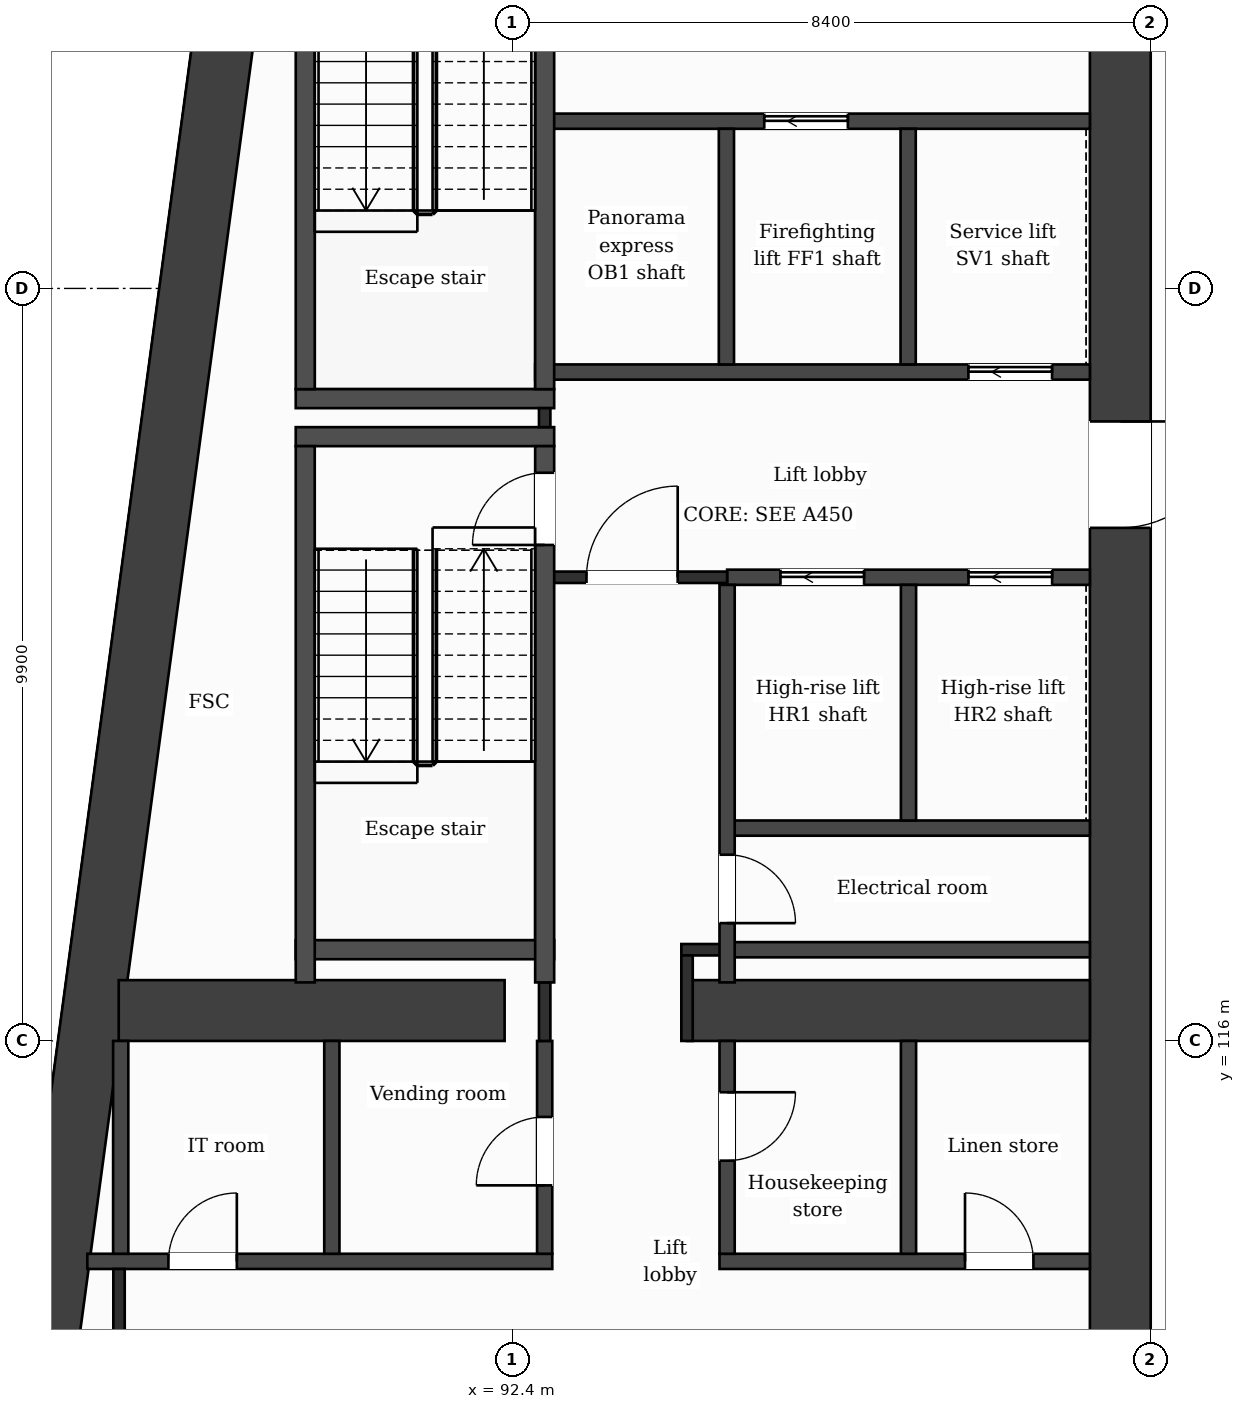
"""IFC4 building model, lengths in metres.
Left out: names, types, materials, properties, quantities, classifications, styles, units other than length and angle.
Written with IfcOpenShell. Run it as: python <this file> out.ifc"""

import sys

from ifc_helpers import new_model, si_unit, direction, frame, frame_2d, origin, place, context, subcontext, project, spatial, rectangle, extrude, element, fill, save


model = new_model("IFC4")
c1 = context("Model", 3, precision=1e-05, world=origin(), true_north=direction((0.0, 1.0)))
c2 = subcontext(c1, "Body", "Model", "MODEL_VIEW")
j1 = project(units=[si_unit("LENGTHUNIT", "METRE"), si_unit("PLANEANGLEUNIT", "RADIAN")], contexts=[c1])
p1 = place(None, origin())
s1 = spatial("IfcSite", under=j1, at=p1, CompositionType="ELEMENT")
p2 = place(p1, origin())
s2 = spatial("IfcBuilding", under=s1, at=p2, CompositionType="ELEMENT")
p3 = place(p2, frame((0.0, 0.0, 205.9)))
s3 = spatial("IfcBuildingStorey", under=s2, at=p3, CompositionType="ELEMENT", Elevation=205.9)
p4 = place(p3, frame((100.4, 132.0, 0.0), z_axis=(0.0, 0.0, 1.0), x_axis=(0.0, -1.0, 0.0)))
e1 = element("IfcWall", 1, at=p4, inside=s3, PredefinedType="SHEAR", context=c2, shape_type="SweptSolid", body=[
    extrude(rectangle(XDim=21.2, YDim=0.8, at=frame_2d((10.6, 0.0))), origin(), (0.0, 0.0, 1.0), 3.7),
])
p5 = place(p4, frame((7.85, 0.0, 0.0)))
e2 = element("IfcOpeningElement", 2, at=p5, cuts=e1, PredefinedType="OPENING", context=c2, shape_type="SweptSolid", body=[
    extrude(rectangle(XDim=1.4, YDim=2.1, at=frame_2d((0.7, 1.05))), frame((0.0, 0.41, 0.0), z_axis=(0.0, -1.0, 0.0), x_axis=(1.0, 0.0, 0.0)), (0.0, 0.0, 1.0), 0.82),
])
p6 = place(p3, frame((86.127, 110.8, 0.0), z_axis=(0.0, 0.0, 1.0), x_axis=(0.133408347329, 0.991061154956, 0.0)))
e3 = element("IfcWall", 3, at=p6, inside=s3, PredefinedType="SHEAR", context=c2, shape_type="SweptSolid", body=[
    extrude(rectangle(XDim=21.391, YDim=0.8, at=frame_2d((10.696, 0.0))), origin(), (0.0, 0.0, 1.0), 3.7),
])
p7 = place(p3, frame((87.223, 116.4, 0.0), z_axis=(0.0, 0.0, 1.0), x_axis=(1.0, 0.0, 0.0)))
e4 = element("IfcWall", 4, at=p7, inside=s3, PredefinedType="SHEAR", context=c2, shape_type="SweptSolid", body=[
    extrude(rectangle(XDim=5.077, YDim=0.8, at=frame_2d((2.539, 0.0))), origin(), (0.0, 0.0, 1.0), 3.7),
])
p8 = place(p3, frame((94.7, 116.4, 0.0), z_axis=(0.0, 0.0, 1.0), x_axis=(1.0, 0.0, 0.0)))
e5 = element("IfcWall", 5, at=p8, inside=s3, PredefinedType="SHEAR", context=c2, shape_type="SweptSolid", body=[
    extrude(rectangle(XDim=5.3, YDim=0.8, at=frame_2d((2.65, 0.0))), origin(), (0.0, 0.0, 1.0), 3.7),
])
p9 = place(p3, frame((86.81, 113.1, 0.0), z_axis=(0.0, 0.0, 1.0), x_axis=(1.0, 0.0, 0.0)))
e6 = element("IfcWall", 6, at=p9, inside=s3, PredefinedType="PARTITIONING", context=c2, shape_type="SweptSolid", body=[
    extrude(rectangle(XDim=6.117, YDim=0.2, at=frame_2d((3.059, 0.0))), origin(), (0.0, 0.0, 1.0), 3.38),
])
p10 = place(p9, frame((1.067, 0.0, 0.0)))
e7 = element("IfcOpeningElement", 7, at=p10, cuts=e6, PredefinedType="OPENING", context=c2, shape_type="SweptSolid", body=[
    extrude(rectangle(XDim=0.9, YDim=2.1, at=frame_2d((0.45, 1.05))), frame((0.0, 0.11, 0.0), z_axis=(0.0, -1.0, 0.0), x_axis=(1.0, 0.0, 0.0)), (0.0, 0.0, 1.0), 0.22),
])
p11 = place(p3, frame((95.127, 113.1, 0.0), z_axis=(0.0, 0.0, 1.0), x_axis=(1.0, 0.0, 0.0)))
e8 = element("IfcWall", 8, at=p11, inside=s3, PredefinedType="PARTITIONING", context=c2, shape_type="SweptSolid", body=[
    extrude(rectangle(XDim=4.873, YDim=0.2, at=frame_2d((2.437, 0.0))), origin(), (0.0, 0.0, 1.0), 3.38),
])
p12 = place(p11, frame((3.23, 0.0, 0.0)))
e9 = element("IfcOpeningElement", 9, at=p12, cuts=e8, PredefinedType="OPENING", context=c2, shape_type="SweptSolid", body=[
    extrude(rectangle(XDim=0.9, YDim=2.1, at=frame_2d((0.45, 1.05))), frame((0.0, 0.11, 0.0), z_axis=(0.0, -1.0, 0.0), x_axis=(1.0, 0.0, 0.0)), (0.0, 0.0, 1.0), 0.22),
])
p13 = place(p3, frame((95.227, 117.2, 0.0), z_axis=(0.0, 0.0, 1.0), x_axis=(1.0, 0.0, 0.0)))
e10 = element("IfcWall", 10, at=p13, inside=s3, PredefinedType="PARTITIONING", context=c2, shape_type="SweptSolid", body=[
    extrude(rectangle(XDim=4.773, YDim=0.2, at=frame_2d((2.386, 0.0))), origin(), (0.0, 0.0, 1.0), 3.38),
])
p14 = place(p3, frame((94.625, 117.2, 0.0), z_axis=(0.0, 0.0, 1.0), x_axis=(1.0, 0.0, 0.0)))
e11 = element("IfcWall", 11, at=p14, inside=s3, PredefinedType="PARTITIONING", context=c2, shape_type="SweptSolid", body=[
    extrude(rectangle(XDim=0.602, YDim=0.15, at=frame_2d((0.301, 0.0))), origin(), (0.0, 0.0, 1.0), 3.38),
])
p15 = place(p3, frame((89.552, 117.2, 0.0), z_axis=(0.0, 0.0, 1.0), x_axis=(1.0, 0.0, 0.0)))
e12 = element("IfcWall", 12, at=p15, inside=s3, PredefinedType="PARTITIONING", context=c2, shape_type="SweptSolid", body=[
    extrude(rectangle(XDim=3.4, YDim=0.25, at=frame_2d((1.7, 0.0))), origin(), (0.0, 0.0, 1.0), 3.38),
])
p16 = place(p3, frame((95.227, 118.8, 0.0), z_axis=(0.0, 0.0, 1.0), x_axis=(1.0, 0.0, 0.0)))
e13 = element("IfcWall", 13, at=p16, inside=s3, PredefinedType="PARTITIONING", context=c2, shape_type="SweptSolid", body=[
    extrude(rectangle(XDim=4.773, YDim=0.2, at=frame_2d((2.386, 0.0))), origin(), (0.0, 0.0, 1.0), 3.38),
])
p17 = place(p3, frame((95.227, 122.1, 0.0), z_axis=(0.0, 0.0, 1.0), x_axis=(1.0, 0.0, 0.0)))
e14 = element("IfcWall", 14, at=p17, inside=s3, PredefinedType="PARTITIONING", context=c2, shape_type="SweptSolid", body=[
    extrude(rectangle(XDim=4.773, YDim=0.2, at=frame_2d((2.386, 0.0))), origin(), (0.0, 0.0, 1.0), 3.38),
])
p18 = place(p17, frame((0.702, 0.0, 0.0)))
e15 = element("IfcOpeningElement", 15, at=p18, cuts=e14, PredefinedType="OPENING", context=c2, shape_type="SweptSolid", body=[
    extrude(rectangle(XDim=1.1, YDim=2.1, at=frame_2d((0.55, 1.05))), frame((0.0, 0.11, 0.0), z_axis=(0.0, -1.0, 0.0), x_axis=(1.0, 0.0, 0.0)), (0.0, 0.0, 1.0), 0.22),
])
p19 = place(p17, frame((3.176, 0.0, 0.0)))
e16 = element("IfcOpeningElement", 16, at=p19, cuts=e14, PredefinedType="OPENING", context=c2, shape_type="SweptSolid", body=[
    extrude(rectangle(XDim=1.1, YDim=2.1, at=frame_2d((0.55, 1.05))), frame((0.0, 0.11, 0.0), z_axis=(0.0, -1.0, 0.0), x_axis=(1.0, 0.0, 0.0)), (0.0, 0.0, 1.0), 0.22),
])
p20 = place(p3, frame((92.827, 122.1, 0.0), z_axis=(0.0, 0.0, 1.0), x_axis=(1.0, 0.0, 0.0)))
e17 = element("IfcWall", 17, at=p20, inside=s3, PredefinedType="PARTITIONING", context=c2, shape_type="SweptSolid", body=[
    extrude(rectangle(XDim=2.4, YDim=0.15, at=frame_2d((1.2, 0.0))), origin(), (0.0, 0.0, 1.0), 3.38),
])
p21 = place(p20, frame((0.55, 0.0, 0.0)))
e18 = element("IfcOpeningElement", 18, at=p21, cuts=e17, PredefinedType="OPENING", context=c2, shape_type="SweptSolid", body=[
    extrude(rectangle(XDim=1.2, YDim=2.1, at=frame_2d((0.6, 1.05))), frame((0.0, 0.085, 0.0), z_axis=(0.0, -1.0, 0.0), x_axis=(1.0, 0.0, 0.0)), (0.0, 0.0, 1.0), 0.17),
])
for number, where, z_axis, x_axis in (
    (19, (89.552, 123.95, 0.0), (0.0, 0.0, 1.0), (1.0, 0.0, 0.0)),
    (20, (89.552, 124.45, 0.0), (0.0, 0.0, 1.0), (1.0, 0.0, 0.0)),
):
    element("IfcWall", number, at=place(p3, frame(where, z_axis=z_axis, x_axis=x_axis)), inside=s3, PredefinedType="PARTITIONING", context=c2, shape_type="SweptSolid", body=[
        extrude(rectangle(XDim=3.4, YDim=0.25, at=frame_2d((1.7, 0.0))), origin(), (0.0, 0.0, 1.0), 3.38),
    ])
p22 = place(p3, frame((92.702, 124.8, 0.0), z_axis=(0.0, 0.0, 1.0), x_axis=(1.0, 0.0, 0.0)))
e21 = element("IfcWall", 21, at=p22, inside=s3, PredefinedType="PARTITIONING", context=c2, shape_type="SweptSolid", body=[
    extrude(rectangle(XDim=7.298, YDim=0.2, at=frame_2d((3.649, 0.0))), origin(), (0.0, 0.0, 1.0), 3.38),
])
p23 = place(p22, frame((5.7, 0.0, 0.0)))
e22 = element("IfcOpeningElement", 22, at=p23, cuts=e21, PredefinedType="OPENING", context=c2, shape_type="SweptSolid", body=[
    extrude(rectangle(XDim=1.1, YDim=2.1, at=frame_2d((0.55, 1.05))), frame((0.0, 0.11, 0.0), z_axis=(0.0, -1.0, 0.0), x_axis=(1.0, 0.0, 0.0)), (0.0, 0.0, 1.0), 0.22),
])
p24 = place(p3, frame((92.827, 128.1, 0.0), z_axis=(0.0, 0.0, 1.0), x_axis=(1.0, 0.0, 0.0)))
e23 = element("IfcWall", 23, at=p24, inside=s3, PredefinedType="PARTITIONING", context=c2, shape_type="SweptSolid", body=[
    extrude(rectangle(XDim=7.173, YDim=0.2, at=frame_2d((3.586, 0.0))), origin(), (0.0, 0.0, 1.0), 3.38),
])
p25 = place(p24, frame((2.889, 0.0, 0.0)))
e24 = element("IfcOpeningElement", 24, at=p25, cuts=e23, PredefinedType="OPENING", context=c2, shape_type="SweptSolid", body=[
    extrude(rectangle(XDim=1.1, YDim=2.1, at=frame_2d((0.55, 1.05))), frame((0.0, 0.11, 0.0), z_axis=(0.0, -1.0, 0.0), x_axis=(1.0, 0.0, 0.0)), (0.0, 0.0, 1.0), 0.22),
])
p26 = place(p3, frame((87.25, 113.2, 0.0), z_axis=(0.0, 0.0, 1.0), x_axis=(0.0, 1.0, 0.0)))
e25 = element("IfcWall", 25, at=p26, inside=s3, PredefinedType="PARTITIONING", context=c2, shape_type="SweptSolid", body=[
    extrude(rectangle(XDim=2.8, YDim=0.2, at=frame_2d((1.4, 0.0))), origin(), (0.0, 0.0, 1.0), 3.38),
])
p27 = place(p3, frame((87.227, 111.2, 0.0), z_axis=(0.0, 0.0, 1.0), x_axis=(0.0, 1.0, 0.0)))
e26 = element("IfcWall", 26, at=p27, inside=s3, PredefinedType="PARTITIONING", context=c2, shape_type="SweptSolid", body=[
    extrude(rectangle(XDim=1.8, YDim=0.15, at=frame_2d((0.9, 0.0))), origin(), (0.0, 0.0, 1.0), 3.38),
])
for number, where, z_axis, x_axis in (
    (27, (89.677, 116.77, 0.0), (0.0, 0.0, 1.0), (0.0, 1.0, 0.0)),
    (28, (89.677, 124.575, 0.0), (0.0, 0.0, 1.0), (0.0, 1.0, 0.0)),
):
    element("IfcWall", number, at=place(p3, frame(where, z_axis=z_axis, x_axis=x_axis)), inside=s3, PredefinedType="PARTITIONING", context=c2, shape_type="SweptSolid", body=[
        extrude(rectangle(XDim=7.055, YDim=0.25, at=frame_2d((3.527, 0.0))), origin(), (0.0, 0.0, 1.0), 3.38),
    ])
p28 = place(p3, frame((90.027, 113.2, 0.0), z_axis=(0.0, 0.0, 1.0), x_axis=(0.0, 1.0, 0.0)))
e29 = element("IfcWall", 29, at=p28, inside=s3, PredefinedType="PARTITIONING", context=c2, shape_type="SweptSolid", body=[
    extrude(rectangle(XDim=2.8, YDim=0.2, at=frame_2d((1.4, 0.0))), origin(), (0.0, 0.0, 1.0), 3.38),
])
p29 = place(p3, frame((92.827, 113.2, 0.0), z_axis=(0.0, 0.0, 1.0), x_axis=(0.0, 1.0, 0.0)))
e30 = element("IfcWall", 30, at=p29, inside=s3, PredefinedType="PARTITIONING", context=c2, shape_type="SweptSolid", body=[
    extrude(rectangle(XDim=2.8, YDim=0.2, at=frame_2d((1.4, 0.0))), origin(), (0.0, 0.0, 1.0), 3.38),
])
p30 = place(p29, frame((0.9, 0.0, 0.0)))
e31 = element("IfcOpeningElement", 31, at=p30, cuts=e30, PredefinedType="OPENING", context=c2, shape_type="SweptSolid", body=[
    extrude(rectangle(XDim=0.9, YDim=2.1, at=frame_2d((0.45, 1.05))), frame((0.0, 0.11, 0.0), z_axis=(0.0, -1.0, 0.0), x_axis=(1.0, 0.0, 0.0)), (0.0, 0.0, 1.0), 0.22),
])
p31 = place(p3, frame((92.827, 116.0, 0.0), z_axis=(0.0, 0.0, 1.0), x_axis=(0.0, 1.0, 0.0)))
e32 = element("IfcWall", 32, at=p31, inside=s3, PredefinedType="PARTITIONING", context=c2, shape_type="SweptSolid", body=[
    extrude(rectangle(XDim=0.77, YDim=0.15, at=frame_2d((0.385, 0.0))), origin(), (0.0, 0.0, 1.0), 3.38),
])
p32 = place(p3, frame((92.827, 124.075, 0.0), z_axis=(0.0, 0.0, 1.0), x_axis=(0.0, 1.0, 0.0)))
e33 = element("IfcWall", 33, at=p32, inside=s3, PredefinedType="PARTITIONING", context=c2, shape_type="SweptSolid", body=[
    extrude(rectangle(XDim=0.25, YDim=0.15, at=frame_2d((0.125, 0.0))), origin(), (0.0, 0.0, 1.0), 3.38),
])
p33 = place(p3, frame((92.827, 116.77, 0.0), z_axis=(0.0, 0.0, 1.0), x_axis=(0.0, 1.0, 0.0)))
e34 = element("IfcWall", 34, at=p33, inside=s3, PredefinedType="PARTITIONING", context=c2, shape_type="SweptSolid", body=[
    extrude(rectangle(XDim=7.055, YDim=0.25, at=frame_2d((3.527, 0.0))), origin(), (0.0, 0.0, 1.0), 3.38),
])
p34 = place(p33, frame((5.755, 0.0, 0.0)))
e35 = element("IfcOpeningElement", 35, at=p34, cuts=e34, PredefinedType="OPENING", context=c2, shape_type="SweptSolid", body=[
    extrude(rectangle(XDim=0.95, YDim=2.1, at=frame_2d((0.475, 1.05))), frame((0.0, 0.135, 0.0), z_axis=(0.0, -1.0, 0.0), x_axis=(1.0, 0.0, 0.0)), (0.0, 0.0, 1.0), 0.27),
])
p35 = place(p3, frame((92.827, 124.575, 0.0), z_axis=(0.0, 0.0, 1.0), x_axis=(0.0, 1.0, 0.0)))
e36 = element("IfcWall", 36, at=p35, inside=s3, PredefinedType="PARTITIONING", context=c2, shape_type="SweptSolid", body=[
    extrude(rectangle(XDim=7.055, YDim=0.25, at=frame_2d((3.527, 0.0))), origin(), (0.0, 0.0, 1.0), 3.38),
])
p36 = place(p35, frame((5.325, 0.0, 0.0)))
e37 = element("IfcOpeningElement", 37, at=p36, cuts=e36, PredefinedType="OPENING", context=c2, shape_type="SweptSolid", body=[
    extrude(rectangle(XDim=1.0, YDim=2.1, at=frame_2d((0.5, 1.05))), frame((0.0, 0.135, 0.0), z_axis=(0.0, -1.0, 0.0), x_axis=(1.0, 0.0, 0.0)), (0.0, 0.0, 1.0), 0.27),
])
p37 = place(p3, frame((94.7, 116.0, 0.0), z_axis=(0.0, 0.0, 1.0), x_axis=(0.0, 1.0, 0.0)))
e38 = element("IfcWall", 38, at=p37, inside=s3, PredefinedType="PARTITIONING", context=c2, shape_type="SweptSolid", body=[
    extrude(rectangle(XDim=1.125, YDim=0.15, at=frame_2d((0.562, 0.0))), origin(), (0.0, 0.0, 1.0), 3.38),
])
p38 = place(p3, frame((95.218, 124.9, 0.0), z_axis=(0.0, 0.0, 1.0), x_axis=(0.0, 1.0, 0.0)))
e39 = element("IfcWall", 39, at=p38, inside=s3, PredefinedType="PARTITIONING", context=c2, shape_type="SweptSolid", body=[
    extrude(rectangle(XDim=3.1, YDim=0.2, at=frame_2d((1.55, 0.0))), origin(), (0.0, 0.0, 1.0), 3.38),
])
p39 = place(p3, frame((95.227, 113.2, 0.0), z_axis=(0.0, 0.0, 1.0), x_axis=(0.0, 1.0, 0.0)))
e40 = element("IfcWall", 40, at=p39, inside=s3, PredefinedType="PARTITIONING", context=c2, shape_type="SweptSolid", body=[
    extrude(rectangle(XDim=2.8, YDim=0.2, at=frame_2d((1.4, 0.0))), origin(), (0.0, 0.0, 1.0), 3.38),
])
p40 = place(p39, frame((1.225, 0.0, 0.0)))
e41 = element("IfcOpeningElement", 41, at=p40, cuts=e40, PredefinedType="OPENING", context=c2, shape_type="SweptSolid", body=[
    extrude(rectangle(XDim=0.9, YDim=2.1, at=frame_2d((0.45, 1.05))), frame((0.0, 0.11, 0.0), z_axis=(0.0, -1.0, 0.0), x_axis=(1.0, 0.0, 0.0)), (0.0, 0.0, 1.0), 0.22),
])
p41 = place(p3, frame((95.227, 116.77, 0.0), z_axis=(0.0, 0.0, 1.0), x_axis=(0.0, 1.0, 0.0)))
e42 = element("IfcWall", 42, at=p41, inside=s3, PredefinedType="PARTITIONING", context=c2, shape_type="SweptSolid", body=[
    extrude(rectangle(XDim=5.23, YDim=0.2, at=frame_2d((2.615, 0.0))), origin(), (0.0, 0.0, 1.0), 3.38),
])
p42 = place(p41, frame((0.78, 0.0, 0.0)))
e43 = element("IfcOpeningElement", 43, at=p42, cuts=e42, PredefinedType="OPENING", context=c2, shape_type="SweptSolid", body=[
    extrude(rectangle(XDim=0.9, YDim=2.1, at=frame_2d((0.45, 1.05))), frame((0.0, 0.11, 0.0), z_axis=(0.0, -1.0, 0.0), x_axis=(1.0, 0.0, 0.0)), (0.0, 0.0, 1.0), 0.22),
])
p43 = place(p3, frame((97.609, 124.9, 0.0), z_axis=(0.0, 0.0, 1.0), x_axis=(0.0, 1.0, 0.0)))
e44 = element("IfcWall", 44, at=p43, inside=s3, PredefinedType="PARTITIONING", context=c2, shape_type="SweptSolid", body=[
    extrude(rectangle(XDim=3.1, YDim=0.2, at=frame_2d((1.55, 0.0))), origin(), (0.0, 0.0, 1.0), 3.38),
])
p44 = place(p3, frame((97.614, 113.2, 0.0), z_axis=(0.0, 0.0, 1.0), x_axis=(0.0, 1.0, 0.0)))
e45 = element("IfcWall", 45, at=p44, inside=s3, PredefinedType="PARTITIONING", context=c2, shape_type="SweptSolid", body=[
    extrude(rectangle(XDim=2.8, YDim=0.2, at=frame_2d((1.4, 0.0))), origin(), (0.0, 0.0, 1.0), 3.38),
])
p45 = place(p3, frame((97.614, 118.9, 0.0), z_axis=(0.0, 0.0, 1.0), x_axis=(0.0, 1.0, 0.0)))
e46 = element("IfcWall", 46, at=p45, inside=s3, PredefinedType="PARTITIONING", context=c2, shape_type="SweptSolid", body=[
    extrude(rectangle(XDim=3.1, YDim=0.2, at=frame_2d((1.55, 0.0))), origin(), (0.0, 0.0, 1.0), 3.38),
])
p46 = place(p21, origin())
e47 = element("IfcDoor", 47, at=p46, inside=s3, OperationType="SINGLE_SWING_RIGHT", PredefinedType="DOOR", context=c2, shape_type="SweptSolid", body=[
    extrude(rectangle(XDim=1.2, YDim=2.1, at=frame_2d((0.6, 1.05))), frame((0.0, 0.025, 0.0), z_axis=(0.0, -1.0, 0.0), x_axis=(1.0, 0.0, 0.0)), (0.0, 0.0, 1.0), 0.05),
])
fill(e18, e47)
p47 = place(p18, origin())
e48 = element("IfcDoor", 48, at=p47, inside=s3, OperationType="SLIDING_TO_LEFT", PredefinedType="DOOR", context=c2, shape_type="SweptSolid", body=[
    extrude(rectangle(XDim=1.1, YDim=2.1, at=frame_2d((0.55, 1.05))), frame((0.0, 0.025, 0.0), z_axis=(0.0, -1.0, 0.0), x_axis=(1.0, 0.0, 0.0)), (0.0, 0.0, 1.0), 0.05),
])
fill(e15, e48)
p48 = place(p19, origin())
e49 = element("IfcDoor", 49, at=p48, inside=s3, OperationType="SLIDING_TO_LEFT", PredefinedType="DOOR", context=c2, shape_type="SweptSolid", body=[
    extrude(rectangle(XDim=1.1, YDim=2.1, at=frame_2d((0.55, 1.05))), frame((0.0, 0.025, 0.0), z_axis=(0.0, -1.0, 0.0), x_axis=(1.0, 0.0, 0.0)), (0.0, 0.0, 1.0), 0.05),
])
fill(e16, e49)
p49 = place(p25, origin())
e50 = element("IfcDoor", 50, at=p49, inside=s3, OperationType="SLIDING_TO_LEFT", PredefinedType="DOOR", context=c2, shape_type="SweptSolid", body=[
    extrude(rectangle(XDim=1.1, YDim=2.1, at=frame_2d((0.55, 1.05))), frame((0.0, 0.025, 0.0), z_axis=(0.0, -1.0, 0.0), x_axis=(1.0, 0.0, 0.0)), (0.0, 0.0, 1.0), 0.05),
])
fill(e24, e50)
p50 = place(p23, origin())
e51 = element("IfcDoor", 51, at=p50, inside=s3, OperationType="SLIDING_TO_LEFT", PredefinedType="DOOR", context=c2, shape_type="SweptSolid", body=[
    extrude(rectangle(XDim=1.1, YDim=2.1, at=frame_2d((0.55, 1.05))), frame((0.0, 0.025, 0.0), z_axis=(0.0, -1.0, 0.0), x_axis=(1.0, 0.0, 0.0)), (0.0, 0.0, 1.0), 0.05),
])
fill(e22, e51)
p51 = place(p34, origin())
e52 = element("IfcDoor", 52, at=p51, inside=s3, OperationType="SINGLE_SWING_LEFT", PredefinedType="DOOR", context=c2, shape_type="SweptSolid", body=[
    extrude(rectangle(XDim=0.95, YDim=2.1, at=frame_2d((0.475, 1.05))), frame((0.0, 0.025, 0.0), z_axis=(0.0, -1.0, 0.0), x_axis=(1.0, 0.0, 0.0)), (0.0, 0.0, 1.0), 0.05),
])
fill(e35, e52)
p52 = place(p42, origin())
e53 = element("IfcDoor", 53, at=p52, inside=s3, OperationType="SINGLE_SWING_LEFT", PredefinedType="DOOR", context=c2, shape_type="SweptSolid", body=[
    extrude(rectangle(XDim=0.9, YDim=2.1, at=frame_2d((0.45, 1.05))), frame((0.0, 0.025, 0.0), z_axis=(0.0, -1.0, 0.0), x_axis=(1.0, 0.0, 0.0)), (0.0, 0.0, 1.0), 0.05),
])
fill(e43, e53)
p53 = place(p10, origin())
e54 = element("IfcDoor", 54, at=p53, inside=s3, OperationType="SINGLE_SWING_RIGHT", PredefinedType="DOOR", context=c2, shape_type="SweptSolid", body=[
    extrude(rectangle(XDim=0.9, YDim=2.1, at=frame_2d((0.45, 1.05))), frame((0.0, 0.025, 0.0), z_axis=(0.0, -1.0, 0.0), x_axis=(1.0, 0.0, 0.0)), (0.0, 0.0, 1.0), 0.05),
])
fill(e7, e54)
p54 = place(p30, origin())
e55 = element("IfcDoor", 55, at=p54, inside=s3, OperationType="SINGLE_SWING_LEFT", PredefinedType="DOOR", context=c2, shape_type="SweptSolid", body=[
    extrude(rectangle(XDim=0.9, YDim=2.1, at=frame_2d((0.45, 1.05))), frame((0.0, 0.025, 0.0), z_axis=(0.0, -1.0, 0.0), x_axis=(1.0, 0.0, 0.0)), (0.0, 0.0, 1.0), 0.05),
])
fill(e31, e55)
p55 = place(p40, origin())
e56 = element("IfcDoor", 56, at=p55, inside=s3, OperationType="SINGLE_SWING_RIGHT", PredefinedType="DOOR", context=c2, shape_type="SweptSolid", body=[
    extrude(rectangle(XDim=0.9, YDim=2.1, at=frame_2d((0.45, 1.05))), frame((0.0, 0.025, 0.0), z_axis=(0.0, -1.0, 0.0), x_axis=(1.0, 0.0, 0.0)), (0.0, 0.0, 1.0), 0.05),
])
fill(e41, e56)
p56 = place(p12, origin())
e57 = element("IfcDoor", 57, at=p56, inside=s3, OperationType="SINGLE_SWING_LEFT", PredefinedType="DOOR", context=c2, shape_type="SweptSolid", body=[
    extrude(rectangle(XDim=0.9, YDim=2.1, at=frame_2d((0.45, 1.05))), frame((0.0, 0.025, 0.0), z_axis=(0.0, -1.0, 0.0), x_axis=(1.0, 0.0, 0.0)), (0.0, 0.0, 1.0), 0.05),
])
fill(e9, e57)
p57 = place(p5, origin())
e58 = element("IfcDoor", 58, at=p57, inside=s3, OperationType="SINGLE_SWING_LEFT", PredefinedType="DOOR", context=c2, shape_type="SweptSolid", body=[
    extrude(rectangle(XDim=1.4, YDim=2.1, at=frame_2d((0.7, 1.05))), frame((0.0, 0.025, 0.0), z_axis=(0.0, -1.0, 0.0), x_axis=(1.0, 0.0, 0.0)), (0.0, 0.0, 1.0), 0.05),
])
fill(e2, e58)
save(model, sys.argv[1])
